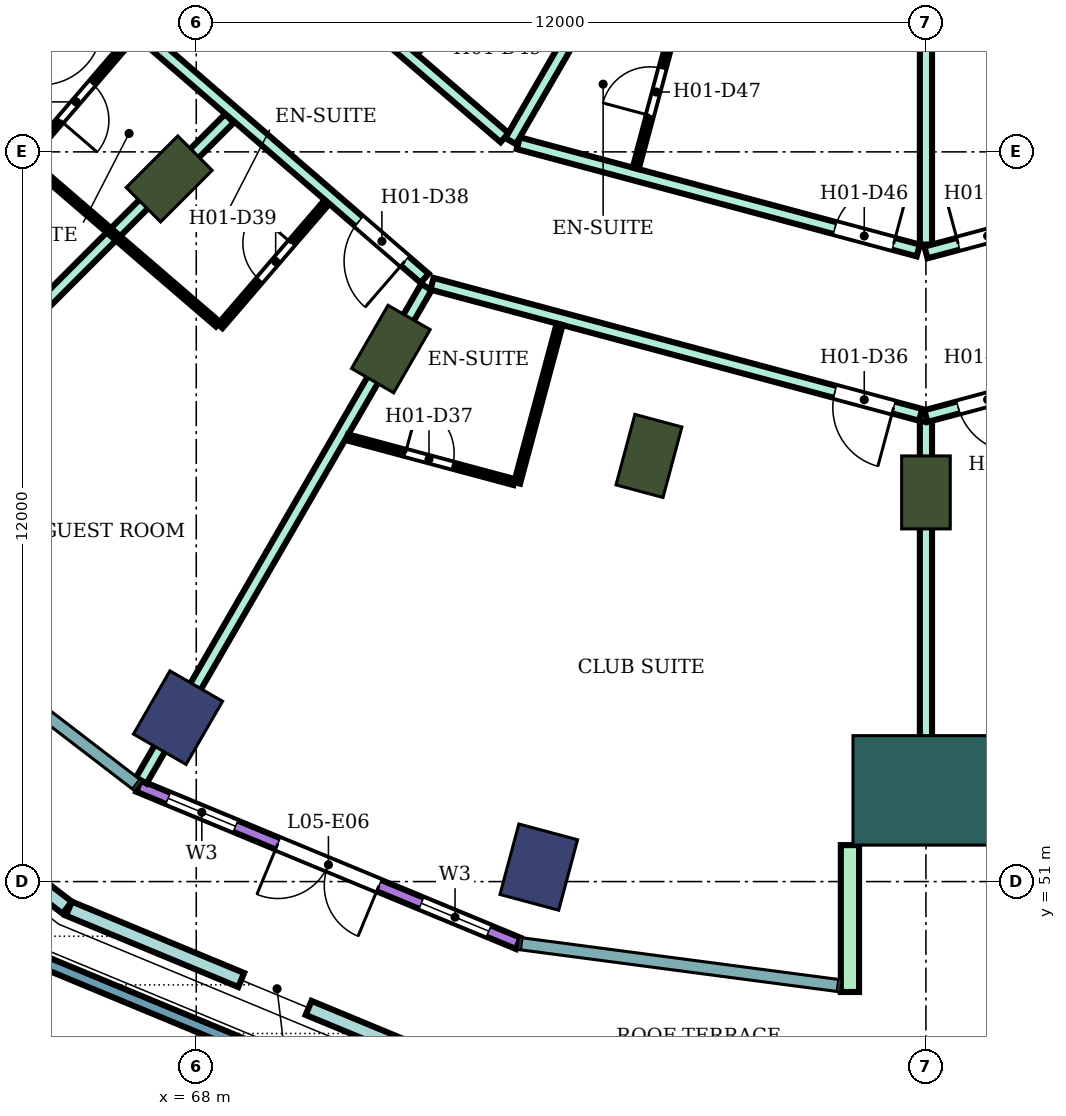
"""IFC4 building model, lengths in metres.
Left out: names, types, materials, properties, quantities, classifications, styles, units other than length and angle.
Written with IfcOpenShell. Run it as: python <this file> out.ifc"""

import sys

from ifc_helpers import new_model, si_unit, direction, frame, frame_2d, origin, origin_2d, place, context, subcontext, project, spatial, rectangle, extrude, element, fill, save


model = new_model("IFC4")
c1 = context("Model", 3, precision=1e-05, world=origin(), true_north=direction((0.0, 1.0)))
c2 = subcontext(c1, "Body", "Model", "MODEL_VIEW")
j1 = project(units=[si_unit("LENGTHUNIT", "METRE"), si_unit("PLANEANGLEUNIT", "RADIAN")], contexts=[c1])
p1 = place(None, origin())
s1 = spatial("IfcSite", under=j1, at=p1, CompositionType="ELEMENT")
p2 = place(p1, origin())
s2 = spatial("IfcBuilding", under=s1, at=p2, CompositionType="ELEMENT")
p3 = place(p2, frame((0.0, 0.0, 28.8)))
s3 = spatial("IfcBuildingStorey", under=s2, at=p3, CompositionType="ELEMENT", Elevation=28.8)
for number, where, z_axis, x_axis in (
    (1, (67.7, 53.696, 0.0), (0.0, 0.0, 1.0), (-0.5, -0.866, 0.0)),
    (2, (73.633, 51.238, 0.0), (0.0, 0.0, 1.0), (-0.259, -0.966, 0.0)),
):
    element("IfcColumn", number, at=place(p3, frame(where, z_axis=z_axis, x_axis=x_axis)), inside=s3, PredefinedType="COLUMN", context=c2, shape_type="SweptSolid", body=[
        extrude(rectangle(XDim=1.2, YDim=1.0, at=origin_2d()), origin(), (0.0, 0.0, 1.0), 3.8),
    ])
for number, where, z_axis, x_axis in (
    (3, (67.555, 62.555, 0.0), (0.0, 0.0, 1.0), (-0.707, -0.707, 0.0)),
    (4, (71.2, 59.758, 0.0), (0.0, 0.0, 1.0), (-0.5, -0.866, 0.0)),
    (5, (75.445, 58.0, 0.0), (0.0, 0.0, 1.0), (-0.259, -0.966, 0.0)),
    (6, (80.0, 57.4, 0.0), (0.0, 0.0, 1.0), (0.0, -1.0, 0.0)),
):
    element("IfcColumn", number, at=place(p3, frame(where, z_axis=z_axis, x_axis=x_axis)), inside=s3, PredefinedType="COLUMN", context=c2, shape_type="SweptSolid", body=[
        extrude(rectangle(XDim=1.2, YDim=0.8, at=origin_2d()), origin(), (0.0, 0.0, 1.0), 3.8),
    ])
p4 = place(p3, frame((80.0, 52.5, 0.0), z_axis=(0.0, 0.0, 1.0), x_axis=(0.0, -1.0, 0.0)))
e7 = element("IfcColumn", 7, at=p4, inside=s3, PredefinedType="COLUMN", context=c2, shape_type="SweptSolid", body=[
    extrude(rectangle(XDim=1.8, YDim=2.4, at=origin_2d()), origin(), (0.0, 0.0, 1.0), 3.8),
])
p5 = place(p3, frame((67.051, 52.571, 0.0), z_axis=(0.0, 0.0, 1.0), x_axis=(0.923875115043, -0.382694096902, 0.0)))
e8 = element("IfcWall", 8, at=p5, inside=s3, PredefinedType="NOTDEFINED", context=c2, shape_type="SweptSolid", body=[
    extrude(rectangle(XDim=6.761, YDim=0.2, at=frame_2d((3.38, 0.0))), origin(), (0.0, 0.0, 1.0), 3.8),
])
p6 = place(p5, frame((0.527, 0.0, 0.9)))
e9 = element("IfcOpeningElement", 9, at=p6, cuts=e8, PredefinedType="OPENING", context=c2, shape_type="SweptSolid", body=[
    extrude(rectangle(XDim=1.2, YDim=2.4, at=frame_2d((0.6, 1.2))), frame((0.0, 0.11, 0.0), z_axis=(0.0, -1.0, 0.0), x_axis=(1.0, 0.0, 0.0)), (0.0, 0.0, 1.0), 0.22),
])
p7 = place(p5, frame((2.48, 0.0, 0.0)))
e10 = element("IfcOpeningElement", 10, at=p7, cuts=e8, PredefinedType="OPENING", context=c2, shape_type="SweptSolid", body=[
    extrude(rectangle(XDim=1.8, YDim=2.4, at=frame_2d((0.9, 1.2))), frame((0.0, 0.11, 0.0), z_axis=(0.0, -1.0, 0.0), x_axis=(1.0, 0.0, 0.0)), (0.0, 0.0, 1.0), 0.22),
])
p8 = place(p5, frame((5.034, 0.0, 0.9)))
e11 = element("IfcOpeningElement", 11, at=p8, cuts=e8, PredefinedType="OPENING", context=c2, shape_type="SweptSolid", body=[
    extrude(rectangle(XDim=1.2, YDim=2.4, at=frame_2d((0.6, 1.2))), frame((0.0, 0.11, 0.0), z_axis=(0.0, -1.0, 0.0), x_axis=(1.0, 0.0, 0.0)), (0.0, 0.0, 1.0), 0.22),
])
p9 = place(p3, frame((78.75, 51.6, 0.0), z_axis=(0.0, 0.0, 1.0), x_axis=(0.0, -1.0, 0.0)))
e12 = element("IfcWall", 12, at=p9, inside=s3, PredefinedType="NOTDEFINED", context=c2, shape_type="SweptSolid", body=[
    extrude(rectangle(XDim=2.416, YDim=0.3, at=frame_2d((1.208, 0.0))), origin(), (0.0, 0.0, 1.0), 3.8),
])
p10 = place(p3, frame((72.431, 46.802, 0.0), z_axis=(0.0, 0.0, 1.0), x_axis=(-0.923876582616, 0.382690553965, 0.0)))
e13 = element("IfcWall", 13, at=p10, inside=s3, PredefinedType="PARAPET", context=c2, shape_type="SweptSolid", body=[
    extrude(rectangle(XDim=7.595, YDim=0.2, at=frame_2d((3.798, 0.0))), origin(), (0.0, 0.0, 1.0), 1.1),
])
for number, where, z_axis, x_axis in (
    (14, (72.681, 47.749, 0.0), (0.0, 0.0, 1.0), (-0.924, 0.383, 0.0)),
    (15, (68.739, 49.382, 0.0), (0.0, 0.0, 1.0), (-0.924, 0.383, 0.0)),
):
    element("IfcWall", number, at=place(p3, frame(where, z_axis=z_axis, x_axis=x_axis)), inside=s3, PredefinedType="USERDEFINED", context=c2, shape_type="SweptSolid", body=[
        extrude(rectangle(XDim=3.067, YDim=0.25, at=frame_2d((1.533, 0.0))), origin(), (0.0, 0.0, 1.0), 0.6),
    ])
p11 = place(p3, frame((65.877, 50.572, 0.0), z_axis=(0.0, 0.0, 1.0), x_axis=(-0.793355967101, 0.608758005668, 0.0)))
e16 = element("IfcWall", 16, at=p11, inside=s3, PredefinedType="USERDEFINED", context=c2, shape_type="SweptSolid", body=[
    extrude(rectangle(XDim=6.232, YDim=0.25, at=frame_2d((3.116, 0.0))), origin(), (0.0, 0.0, 1.0), 0.6),
])
p12 = place(p3, frame((63.592, 58.599, 0.0), z_axis=(0.0, 0.0, 1.0), x_axis=(0.707228748718, 0.706984792613, 0.0)))
e17 = element("IfcWall", 17, at=p12, inside=s3, PredefinedType="PARTITIONING", context=c2, shape_type="SweptSolid", body=[
    extrude(rectangle(XDim=7.005, YDim=0.2, at=frame_2d((3.503, 0.0))), origin(), (0.0, 0.0, 1.0), 3.35),
])
p13 = place(p3, frame((67.078, 64.968, 0.0), z_axis=(0.0, 0.0, 1.0), x_axis=(0.756371089567, -0.654142778656, 0.0)))
e18 = element("IfcWall", 18, at=p13, inside=s3, PredefinedType="PARTITIONING", context=c2, shape_type="SweptSolid", body=[
    extrude(rectangle(XDim=6.185, YDim=0.2, at=frame_2d((3.093, 0.0))), origin(), (0.0, 0.0, 1.0), 3.35),
])
p14 = place(p13, frame((4.755, 0.0, 0.0)))
e19 = element("IfcOpeningElement", 19, at=p14, cuts=e18, PredefinedType="OPENING", context=c2, shape_type="SweptSolid", body=[
    extrude(rectangle(XDim=1.0, YDim=2.1, at=frame_2d((0.5, 1.05))), frame((0.0, 0.11, 0.0), z_axis=(0.0, -1.0, 0.0), x_axis=(1.0, 0.0, 0.0)), (0.0, 0.0, 1.0), 0.22),
])
p15 = place(p3, frame((67.096, 52.662, 0.0), z_axis=(0.0, 0.0, 1.0), x_axis=(0.500242450002, 0.865885379953, 0.0)))
e20 = element("IfcWall", 20, at=p15, inside=s3, PredefinedType="PARTITIONING", context=c2, shape_type="SweptSolid", body=[
    extrude(rectangle(XDim=9.374, YDim=0.2, at=frame_2d((4.687, 0.0))), origin(), (0.0, 0.0, 1.0), 3.35),
])
p16 = place(p3, frame((69.158, 66.6, 0.0), z_axis=(0.0, 0.0, 1.0), x_axis=(0.757976058094, -0.652282373943, 0.0)))
e21 = element("IfcWall", 21, at=p16, inside=s3, PredefinedType="PARTITIONING", context=c2, shape_type="SweptSolid", body=[
    extrude(rectangle(XDim=5.16, YDim=0.2, at=frame_2d((2.58, 0.0))), origin(), (0.0, 0.0, 1.0), 3.35),
])
p17 = place(p16, frame((1.6, 0.0, 0.0)))
e22 = element("IfcOpeningElement", 22, at=p17, cuts=e21, PredefinedType="OPENING", context=c2, shape_type="SweptSolid", body=[
    extrude(rectangle(XDim=1.0, YDim=2.1, at=frame_2d((0.5, 1.05))), frame((0.0, 0.11, 0.0), z_axis=(0.0, -1.0, 0.0), x_axis=(1.0, 0.0, 0.0)), (0.0, 0.0, 1.0), 0.22),
])
p18 = place(p3, frame((71.877, 60.831, 0.0), z_axis=(0.0, 0.0, 1.0), x_axis=(0.965852509869, -0.259092510851, 0.0)))
e23 = element("IfcWall", 23, at=p18, inside=s3, PredefinedType="PARTITIONING", context=c2, shape_type="SweptSolid", body=[
    extrude(rectangle(XDim=8.32, YDim=0.2, at=frame_2d((4.16, 0.0))), origin(), (0.0, 0.0, 1.0), 3.35),
])
p19 = place(p18, frame((6.86, 0.0, 0.0)))
e24 = element("IfcOpeningElement", 24, at=p19, cuts=e23, PredefinedType="OPENING", context=c2, shape_type="SweptSolid", body=[
    extrude(rectangle(XDim=1.0, YDim=2.1, at=frame_2d((0.5, 1.05))), frame((0.0, 0.11, 0.0), z_axis=(0.0, -1.0, 0.0), x_axis=(1.0, 0.0, 0.0)), (0.0, 0.0, 1.0), 0.22),
])
p20 = place(p3, frame((73.297, 63.143, 0.0), z_axis=(0.0, 0.0, 1.0), x_axis=(0.965859030528, -0.25906820173, 0.0)))
e25 = element("IfcWall", 25, at=p20, inside=s3, PredefinedType="PARTITIONING", context=c2, shape_type="SweptSolid", body=[
    extrude(rectangle(XDim=6.81, YDim=0.2, at=frame_2d((3.405, 0.0))), origin(), (0.0, 0.0, 1.0), 3.35),
])
p21 = place(p20, frame((5.39, 0.0, 0.0)))
e26 = element("IfcOpeningElement", 26, at=p21, cuts=e25, PredefinedType="OPENING", context=c2, shape_type="SweptSolid", body=[
    extrude(rectangle(XDim=1.0, YDim=2.1, at=frame_2d((0.5, 1.05))), frame((0.0, 0.11, 0.0), z_axis=(0.0, -1.0, 0.0), x_axis=(1.0, 0.0, 0.0)), (0.0, 0.0, 1.0), 0.22),
])
p22 = place(p3, frame((73.171, 63.177, 0.0), z_axis=(0.0, 0.0, 1.0), x_axis=(0.500257106344, 0.865876912472, 0.0)))
e27 = element("IfcWall", 27, at=p22, inside=s3, PredefinedType="PARTITIONING", context=c2, shape_type="SweptSolid", body=[
    extrude(rectangle(XDim=5.955, YDim=0.2, at=frame_2d((2.978, 0.0))), origin(), (0.0, 0.0, 1.0), 3.35),
])
p23 = place(p3, frame((80.0, 51.801, 0.0), z_axis=(0.0, 0.0, 1.0), x_axis=(0.0, 1.0, 0.0)))
e28 = element("IfcWall", 28, at=p23, inside=s3, PredefinedType="PARTITIONING", context=c2, shape_type="SweptSolid", body=[
    extrude(rectangle(XDim=6.762, YDim=0.2, at=frame_2d((3.381, 0.0))), origin(), (0.0, 0.0, 1.0), 3.35),
])
p24 = place(p3, frame((80.0, 58.655, 0.0), z_axis=(0.0, 0.0, 1.0), x_axis=(0.965974635626, 0.258636817424, 0.0)))
e29 = element("IfcWall", 29, at=p24, inside=s3, PredefinedType="PARTITIONING", context=c2, shape_type="SweptSolid", body=[
    extrude(rectangle(XDim=8.36, YDim=0.2, at=frame_2d((4.18, 0.0))), origin(), (0.0, 0.0, 1.0), 3.35),
])
p25 = place(p24, frame((6.86, 0.0, 0.0)))
e30 = element("IfcOpeningElement", 30, at=p25, cuts=e29, PredefinedType="OPENING", context=c2, shape_type="SweptSolid", body=[
    extrude(rectangle(XDim=1.0, YDim=2.1, at=frame_2d((0.5, 1.05))), frame((0.0, 0.11, 0.0), z_axis=(0.0, -1.0, 0.0), x_axis=(1.0, 0.0, 0.0)), (0.0, 0.0, 1.0), 0.22),
])
p26 = place(p24, frame((0.55, 0.0, 0.0)))
e31 = element("IfcOpeningElement", 31, at=p26, cuts=e29, PredefinedType="OPENING", context=c2, shape_type="SweptSolid", body=[
    extrude(rectangle(XDim=1.0, YDim=2.1, at=frame_2d((0.5, 1.05))), frame((0.0, 0.11, 0.0), z_axis=(0.0, -1.0, 0.0), x_axis=(1.0, 0.0, 0.0)), (0.0, 0.0, 1.0), 0.22),
])
p27 = place(p3, frame((80.0, 61.476, 0.0), z_axis=(0.0, 0.0, 1.0), x_axis=(0.0, 1.0, 0.0)))
e32 = element("IfcWall", 32, at=p27, inside=s3, PredefinedType="PARTITIONING", context=c2, shape_type="SweptSolid", body=[
    extrude(rectangle(XDim=5.825, YDim=0.2, at=frame_2d((2.913, 0.0))), origin(), (0.0, 0.0, 1.0), 3.35),
])
p28 = place(p3, frame((80.0, 61.346, 0.0), z_axis=(0.0, 0.0, 1.0), x_axis=(0.965924181808, 0.258825182312, 0.0)))
e33 = element("IfcWall", 33, at=p28, inside=s3, PredefinedType="PARTITIONING", context=c2, shape_type="SweptSolid", body=[
    extrude(rectangle(XDim=6.94, YDim=0.2, at=frame_2d((3.47, 0.0))), origin(), (0.0, 0.0, 1.0), 3.35),
])
p29 = place(p28, frame((0.55, 0.0, 0.0)))
e34 = element("IfcOpeningElement", 34, at=p29, cuts=e33, PredefinedType="OPENING", context=c2, shape_type="SweptSolid", body=[
    extrude(rectangle(XDim=1.0, YDim=2.1, at=frame_2d((0.5, 1.05))), frame((0.0, 0.11, 0.0), z_axis=(0.0, -1.0, 0.0), x_axis=(1.0, 0.0, 0.0)), (0.0, 0.0, 1.0), 0.22),
])
p30 = place(p3, frame((65.242, 62.912, 0.0), z_axis=(0.0, 0.0, 1.0), x_axis=(0.652069888227, 0.758158862553, 0.0)))
e35 = element("IfcWall", 35, at=p30, inside=s3, PredefinedType="PARTITIONING", context=c2, shape_type="SweptSolid", body=[
    extrude(rectangle(XDim=2.75, YDim=0.1, at=frame_2d((1.375, 0.0))), origin(), (0.0, 0.0, 1.0), 3.35),
])
p31 = place(p30, frame((0.8, 0.0, 0.0)))
e36 = element("IfcOpeningElement", 36, at=p31, cuts=e35, PredefinedType="OPENING", context=c2, shape_type="SweptSolid", body=[
    extrude(rectangle(XDim=0.8, YDim=2.1, at=frame_2d((0.4, 1.05))), frame((0.0, 0.06, 0.0), z_axis=(0.0, -1.0, 0.0), x_axis=(1.0, 0.0, 0.0)), (0.0, 0.0, 1.0), 0.12),
])
p32 = place(p3, frame((65.209, 62.875, 0.0), z_axis=(0.0, 0.0, 1.0), x_axis=(0.757930378138, -0.652335451969, 0.0)))
e37 = element("IfcWall", 37, at=p32, inside=s3, PredefinedType="PARTITIONING", context=c2, shape_type="SweptSolid", body=[
    extrude(rectangle(XDim=4.15, YDim=0.1, at=frame_2d((2.075, 0.0))), origin(), (0.0, 0.0, 1.0), 3.35),
])
p33 = place(p3, frame((68.393, 60.135, 0.0), z_axis=(0.0, 0.0, 1.0), x_axis=(0.652061182569, 0.758166349944, 0.0)))
e38 = element("IfcWall", 38, at=p33, inside=s3, PredefinedType="PARTITIONING", context=c2, shape_type="SweptSolid", body=[
    extrude(rectangle(XDim=2.69, YDim=0.1, at=frame_2d((1.345, 0.0))), origin(), (0.0, 0.0, 1.0), 3.35),
])
p34 = place(p33, frame((1.0, 0.0, 0.0)))
e39 = element("IfcOpeningElement", 39, at=p34, cuts=e38, PredefinedType="OPENING", context=c2, shape_type="SweptSolid", body=[
    extrude(rectangle(XDim=0.8, YDim=2.1, at=frame_2d((0.4, 1.05))), frame((0.0, 0.06, 0.0), z_axis=(0.0, -1.0, 0.0), x_axis=(1.0, 0.0, 0.0)), (0.0, 0.0, 1.0), 0.12),
])
p35 = place(p3, frame((70.484, 58.305, 0.0), z_axis=(0.0, 0.0, 1.0), x_axis=(0.965904703781, -0.258897862512, 0.0)))
e40 = element("IfcWall", 40, at=p35, inside=s3, PredefinedType="PARTITIONING", context=c2, shape_type="SweptSolid", body=[
    extrude(rectangle(XDim=2.841, YDim=0.1, at=frame_2d((1.421, 0.0))), origin(), (0.0, 0.0, 1.0), 3.35),
])
p36 = place(p35, frame((0.99, 0.0, 0.0)))
e41 = element("IfcOpeningElement", 41, at=p36, cuts=e40, PredefinedType="OPENING", context=c2, shape_type="SweptSolid", body=[
    extrude(rectangle(XDim=0.8, YDim=2.1, at=frame_2d((0.4, 1.05))), frame((0.0, 0.06, 0.0), z_axis=(0.0, -1.0, 0.0), x_axis=(1.0, 0.0, 0.0)), (0.0, 0.0, 1.0), 0.12),
])
p37 = place(p3, frame((71.596, 64.635, 0.0), z_axis=(0.0, 0.0, 1.0), x_axis=(0.652285007511, 0.757973791748, 0.0)))
e42 = element("IfcWall", 42, at=p37, inside=s3, PredefinedType="PARTITIONING", context=c2, shape_type="SweptSolid", body=[
    extrude(rectangle(XDim=2.65, YDim=0.1, at=frame_2d((1.325, 0.0))), origin(), (0.0, 0.0, 1.0), 3.35),
])
p38 = place(p37, frame((0.6, 0.0, 0.0)))
e43 = element("IfcOpeningElement", 43, at=p38, cuts=e42, PredefinedType="OPENING", context=c2, shape_type="SweptSolid", body=[
    extrude(rectangle(XDim=0.8, YDim=2.1, at=frame_2d((0.4, 1.05))), frame((0.0, 0.06, 0.0), z_axis=(0.0, -1.0, 0.0), x_axis=(1.0, 0.0, 0.0)), (0.0, 0.0, 1.0), 0.12),
])
p39 = place(p3, frame((73.277, 57.557, 0.0), z_axis=(0.0, 0.0, 1.0), x_axis=(0.258928960762, 0.965896367774, 0.0)))
e44 = element("IfcWall", 44, at=p39, inside=s3, PredefinedType="PARTITIONING", context=c2, shape_type="SweptSolid", body=[
    extrude(rectangle(XDim=2.699, YDim=0.1, at=frame_2d((1.35, 0.0))), origin(), (0.0, 0.0, 1.0), 3.35),
])
p40 = place(p3, frame((75.227, 62.729, 0.0), z_axis=(0.0, 0.0, 1.0), x_axis=(0.258945475746, 0.965891940432, 0.0)))
e45 = element("IfcWall", 45, at=p40, inside=s3, PredefinedType="PARTITIONING", context=c2, shape_type="SweptSolid", body=[
    extrude(rectangle(XDim=2.7, YDim=0.1, at=frame_2d((1.35, 0.0))), origin(), (0.0, 0.0, 1.0), 3.35),
])
p41 = place(p40, frame((0.9, 0.0, 0.0)))
e46 = element("IfcOpeningElement", 46, at=p41, cuts=e45, PredefinedType="OPENING", context=c2, shape_type="SweptSolid", body=[
    extrude(rectangle(XDim=0.8, YDim=2.1, at=frame_2d((0.4, 1.05))), frame((0.0, 0.06, 0.0), z_axis=(0.0, -1.0, 0.0), x_axis=(1.0, 0.0, 0.0)), (0.0, 0.0, 1.0), 0.12),
])
p42 = place(p6, origin())
e47 = element("IfcWindow", 47, at=p42, inside=s3, PartitioningType="SINGLE_PANEL", PredefinedType="WINDOW", context=c2, shape_type="SweptSolid", body=[
    extrude(rectangle(XDim=1.2, YDim=2.4, at=frame_2d((0.6, 1.2))), frame((0.0, 0.03, 0.0), z_axis=(0.0, -1.0, 0.0), x_axis=(1.0, 0.0, 0.0)), (0.0, 0.0, 1.0), 0.06),
])
fill(e9, e47)
p43 = place(p7, frame((1.8, 0.0, 0.0), z_axis=(0.0, 0.0, 1.0), x_axis=(-1.0, 0.0, 0.0)))
e48 = element("IfcDoor", 48, at=p43, inside=s3, OperationType="DOUBLE_DOOR_SINGLE_SWING", PredefinedType="DOOR", context=c2, shape_type="SweptSolid", body=[
    extrude(rectangle(XDim=1.8, YDim=2.4, at=frame_2d((0.9, 1.2))), frame((0.0, 0.025, 0.0), z_axis=(0.0, -1.0, 0.0), x_axis=(1.0, 0.0, 0.0)), (0.0, 0.0, 1.0), 0.05),
])
fill(e10, e48)
p44 = place(p8, origin())
e49 = element("IfcWindow", 49, at=p44, inside=s3, PartitioningType="SINGLE_PANEL", PredefinedType="WINDOW", context=c2, shape_type="SweptSolid", body=[
    extrude(rectangle(XDim=1.2, YDim=2.4, at=frame_2d((0.6, 1.2))), frame((0.0, 0.03, 0.0), z_axis=(0.0, -1.0, 0.0), x_axis=(1.0, 0.0, 0.0)), (0.0, 0.0, 1.0), 0.06),
])
fill(e11, e49)
p45 = place(p26, frame((1.0, 0.0, 0.0), z_axis=(0.0, 0.0, 1.0), x_axis=(-1.0, 0.0, 0.0)))
e50 = element("IfcDoor", 50, at=p45, inside=s3, OperationType="SINGLE_SWING_LEFT", PredefinedType="DOOR", context=c2, shape_type="SweptSolid", body=[
    extrude(rectangle(XDim=1.0, YDim=2.1, at=frame_2d((0.5, 1.05))), frame((0.0, 0.025, 0.0), z_axis=(0.0, -1.0, 0.0), x_axis=(1.0, 0.0, 0.0)), (0.0, 0.0, 1.0), 0.05),
])
fill(e31, e50)
p46 = place(p19, frame((1.0, 0.0, 0.0), z_axis=(0.0, 0.0, 1.0), x_axis=(-1.0, 0.0, 0.0)))
e51 = element("IfcDoor", 51, at=p46, inside=s3, OperationType="SINGLE_SWING_LEFT", PredefinedType="DOOR", context=c2, shape_type="SweptSolid", body=[
    extrude(rectangle(XDim=1.0, YDim=2.1, at=frame_2d((0.5, 1.05))), frame((0.0, 0.025, 0.0), z_axis=(0.0, -1.0, 0.0), x_axis=(1.0, 0.0, 0.0)), (0.0, 0.0, 1.0), 0.05),
])
fill(e24, e51)
p47 = place(p36, origin())
e52 = element("IfcDoor", 52, at=p47, inside=s3, OperationType="SINGLE_SWING_LEFT", PredefinedType="DOOR", context=c2, shape_type="SweptSolid", body=[
    extrude(rectangle(XDim=0.8, YDim=2.1, at=frame_2d((0.4, 1.05))), frame((0.0, 0.025, 0.0), z_axis=(0.0, -1.0, 0.0), x_axis=(1.0, 0.0, 0.0)), (0.0, 0.0, 1.0), 0.05),
])
fill(e41, e52)
p48 = place(p14, frame((1.0, 0.0, 0.0), z_axis=(0.0, 0.0, 1.0), x_axis=(-1.0, 0.0, 0.0)))
e53 = element("IfcDoor", 53, at=p48, inside=s3, OperationType="SINGLE_SWING_LEFT", PredefinedType="DOOR", context=c2, shape_type="SweptSolid", body=[
    extrude(rectangle(XDim=1.0, YDim=2.1, at=frame_2d((0.5, 1.05))), frame((0.0, 0.025, 0.0), z_axis=(0.0, -1.0, 0.0), x_axis=(1.0, 0.0, 0.0)), (0.0, 0.0, 1.0), 0.05),
])
fill(e19, e53)
p49 = place(p34, origin())
e54 = element("IfcDoor", 54, at=p49, inside=s3, OperationType="SINGLE_SWING_RIGHT", PredefinedType="DOOR", context=c2, shape_type="SweptSolid", body=[
    extrude(rectangle(XDim=0.8, YDim=2.1, at=frame_2d((0.4, 1.05))), frame((0.0, 0.025, 0.0), z_axis=(0.0, -1.0, 0.0), x_axis=(1.0, 0.0, 0.0)), (0.0, 0.0, 1.0), 0.05),
])
fill(e39, e54)
p50 = place(p31, frame((0.8, 0.0, 0.0), z_axis=(0.0, 0.0, 1.0), x_axis=(-1.0, 0.0, 0.0)))
e55 = element("IfcDoor", 55, at=p50, inside=s3, OperationType="SINGLE_SWING_RIGHT", PredefinedType="DOOR", context=c2, shape_type="SweptSolid", body=[
    extrude(rectangle(XDim=0.8, YDim=2.1, at=frame_2d((0.4, 1.05))), frame((0.0, 0.025, 0.0), z_axis=(0.0, -1.0, 0.0), x_axis=(1.0, 0.0, 0.0)), (0.0, 0.0, 1.0), 0.05),
])
fill(e36, e55)
p51 = place(p29, origin())
e56 = element("IfcDoor", 56, at=p51, inside=s3, OperationType="SINGLE_SWING_LEFT", PredefinedType="DOOR", context=c2, shape_type="SweptSolid", body=[
    extrude(rectangle(XDim=1.0, YDim=2.1, at=frame_2d((0.5, 1.05))), frame((0.0, 0.025, 0.0), z_axis=(0.0, -1.0, 0.0), x_axis=(1.0, 0.0, 0.0)), (0.0, 0.0, 1.0), 0.05),
])
fill(e34, e56)
p52 = place(p21, origin())
e57 = element("IfcDoor", 57, at=p52, inside=s3, OperationType="SINGLE_SWING_RIGHT", PredefinedType="DOOR", context=c2, shape_type="SweptSolid", body=[
    extrude(rectangle(XDim=1.0, YDim=2.1, at=frame_2d((0.5, 1.05))), frame((0.0, 0.025, 0.0), z_axis=(0.0, -1.0, 0.0), x_axis=(1.0, 0.0, 0.0)), (0.0, 0.0, 1.0), 0.05),
])
fill(e26, e57)
p53 = place(p41, origin())
e58 = element("IfcDoor", 58, at=p53, inside=s3, OperationType="SINGLE_SWING_LEFT", PredefinedType="DOOR", context=c2, shape_type="SweptSolid", body=[
    extrude(rectangle(XDim=0.8, YDim=2.1, at=frame_2d((0.4, 1.05))), frame((0.0, 0.025, 0.0), z_axis=(0.0, -1.0, 0.0), x_axis=(1.0, 0.0, 0.0)), (0.0, 0.0, 1.0), 0.05),
])
fill(e46, e58)
save(model, sys.argv[1])
